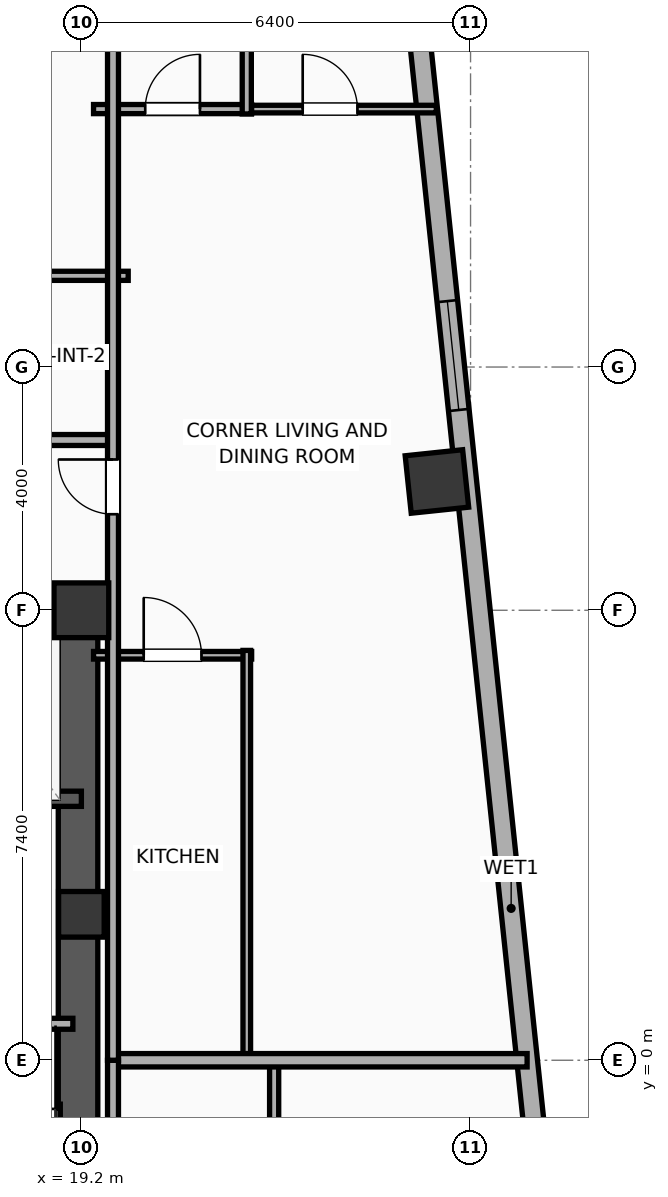
"""IFC4 building model, lengths in metres.
Left out: names, types, materials, properties, quantities, classifications, styles, units other than length and angle.
Written with IfcOpenShell. Run it as: python <this file> out.ifc"""

import sys

from ifc_helpers import new_model, si_unit, direction, frame, frame_2d, origin, origin_2d, place, context, subcontext, project, spatial, rectangle, hollow_rectangle, extrude, element, fill, save


model = new_model("IFC4")
c1 = context("Model", 3, precision=1e-05, world=origin(), true_north=direction((0.0, 1.0)))
c2 = subcontext(c1, "Body", "Model", "MODEL_VIEW")
j1 = project(units=[si_unit("LENGTHUNIT", "METRE"), si_unit("PLANEANGLEUNIT", "RADIAN")], contexts=[c1])
p1 = place(None, origin())
s1 = spatial("IfcSite", under=j1, at=p1, CompositionType="ELEMENT")
p2 = place(p1, origin())
s2 = spatial("IfcBuilding", under=s1, at=p2, CompositionType="ELEMENT")
p3 = place(p2, frame((0.0, 0.0, 187.2)))
s3 = spatial("IfcBuildingStorey", under=s2, at=p3, CompositionType="ELEMENT", Elevation=187.2)
p4 = place(p3, frame((19.2, 2.4, 0.0), z_axis=(0.0, 0.0, 1.0), x_axis=(1.0, 0.0, 0.0)))
e1 = element("IfcColumn", 1, at=p4, inside=s3, PredefinedType="COLUMN", context=c2, shape_type="SweptSolid", body=[
    extrude(rectangle(XDim=0.75, YDim=0.75, at=origin_2d()), origin(), (0.0, 0.0, 1.0), 3.9),
])
p5 = place(p3, frame((19.2, 7.4, 0.0), z_axis=(0.0, 0.0, 1.0), x_axis=(1.0, 0.0, 0.0)))
e2 = element("IfcColumn", 2, at=p5, inside=s3, PredefinedType="COLUMN", context=c2, shape_type="SweptSolid", body=[
    extrude(rectangle(XDim=0.9, YDim=0.9, at=origin_2d()), origin(), (0.0, 0.0, 1.0), 3.9),
])
p6 = place(p3, frame((12.175, 7.4, 0.0), z_axis=(0.0, 0.0, 1.0), x_axis=(1.0, 0.0, 0.0)))
e3 = element("IfcWall", 3, at=p6, inside=s3, PredefinedType="SHEAR", context=c2, shape_type="SweptSolid", body=[
    extrude(rectangle(XDim=7.25, YDim=0.45, at=frame_2d((3.625, 0.0))), origin(), (0.0, 0.0, 1.0), 3.65),
])
p7 = place(p3, frame((19.145, -7.4, 0.0), z_axis=(0.0, 0.0, 1.0), x_axis=(0.0, 1.0, 0.0)))
e4 = element("IfcWall", 4, at=p7, inside=s3, PredefinedType="SHEAR", context=c2, shape_type="SweptSolid", body=[
    extrude(rectangle(XDim=14.8, YDim=0.65, at=frame_2d((7.4, 0.0))), origin(), (0.0, 0.0, 1.0), 3.65),
])
p8 = place(p3, frame((25.047, 9.518, 0.0), z_axis=(0.0, 0.0, 1.0), x_axis=(0.994521895368, 0.104528463268, 0.0)))
e5 = element("IfcColumn", 5, at=p8, inside=s3, PredefinedType="COLUMN", context=c2, shape_type="SweptSolid", body=[
    extrude(hollow_rectangle(XDim=0.95, YDim=0.95, WallThickness=0.032, at=origin_2d()), origin(), (0.0, 0.0, 1.0), 3.9),
])
p9 = place(p3, frame((24.534, 18.99, 0.0), z_axis=(0.0, 0.0, 1.0), x_axis=(0.104534959766, -0.994521212537, 0.0)))
e6 = element("IfcWall", 6, at=p9, inside=s3, PredefinedType="ELEMENTEDWALL", context=c2, shape_type="SweptSolid", body=[
    extrude(rectangle(XDim=33.166, YDim=0.34, at=frame_2d((16.583, 0.0))), origin(), (0.0, 0.0, 1.0), 3.65),
])
p10 = place(p9, frame((6.542, 0.0, 0.75)))
e7 = element("IfcOpeningElement", 7, at=p10, cuts=e6, PredefinedType="OPENING", context=c2, shape_type="SweptSolid", body=[
    extrude(rectangle(XDim=1.8, YDim=2.1, at=frame_2d((0.9, 1.05))), frame((0.0, 0.18, 0.0), z_axis=(0.0, -1.0, 0.0), x_axis=(1.0, 0.0, 0.0)), (0.0, 0.0, 1.0), 0.36),
])
p11 = place(p9, frame((21.84, 0.0, 0.75)))
e8 = element("IfcOpeningElement", 8, at=p11, cuts=e6, PredefinedType="OPENING", context=c2, shape_type="SweptSolid", body=[
    extrude(rectangle(XDim=1.2, YDim=2.05, at=frame_2d((0.6, 1.025))), frame((0.0, 0.18, 0.0), z_axis=(0.0, -1.0, 0.0), x_axis=(1.0, 0.0, 0.0)), (0.0, 0.0, 1.0), 0.36),
])
p12 = place(p3, frame((16.6, 4.3, 0.0), z_axis=(0.0, 0.0, 1.0), x_axis=(1.0, 0.0, 0.0)))
e9 = element("IfcWall", 9, at=p12, inside=s3, PredefinedType="SOLIDWALL", context=c2, shape_type="SweptSolid", body=[
    extrude(rectangle(XDim=2.6, YDim=0.25, at=frame_2d((1.3, 0.0))), origin(), (0.0, 0.0, 1.0), 3.65),
])
p13 = place(p3, frame((15.7, 0.6, 0.0), z_axis=(0.0, 0.0, 1.0), x_axis=(1.0, 0.0, 0.0)))
e10 = element("IfcWall", 10, at=p13, inside=s3, PredefinedType="PARTITIONING", context=c2, shape_type="SweptSolid", body=[
    extrude(rectangle(XDim=3.36, YDim=0.18, at=frame_2d((1.68, 0.0))), origin(), (0.0, 0.0, 1.0), 3.65),
])
p14 = place(p13, frame((1.155, 0.0, 0.0)))
e11 = element("IfcOpeningElement", 11, at=p14, cuts=e10, PredefinedType="OPENING", context=c2, shape_type="SweptSolid", body=[
    extrude(rectangle(XDim=1.05, YDim=2.05, at=frame_2d((0.525, 1.025))), frame((0.0, 0.1, 0.0), z_axis=(0.0, -1.0, 0.0), x_axis=(1.0, 0.0, 0.0)), (0.0, 0.0, 1.0), 0.2),
])
p15 = place(p3, frame((17.337, 12.9, 0.0), z_axis=(0.0, 0.0, 1.0), x_axis=(1.0, 0.0, 0.0)))
e12 = element("IfcWall", 12, at=p15, inside=s3, PredefinedType="PLUMBINGWALL", context=c2, shape_type="SweptSolid", body=[
    extrude(rectangle(XDim=2.633, YDim=0.15, at=frame_2d((1.316, 0.0))), origin(), (0.0, 0.0, 1.0), 3.65),
])
p16 = place(p3, frame((8.08, 10.2, 0.0), z_axis=(0.0, 0.0, 1.0), x_axis=(1.0, 0.0, 0.0)))
e13 = element("IfcWall", 13, at=p16, inside=s3, PredefinedType="PARTITIONING", context=c2, shape_type="SweptSolid", body=[
    extrude(rectangle(XDim=11.67, YDim=0.18, at=frame_2d((5.835, 0.0))), origin(), (0.0, 0.0, 1.0), 3.65),
])
p17 = place(p16, frame((2.604, 0.0, 0.0)))
e14 = element("IfcOpeningElement", 14, at=p17, cuts=e13, PredefinedType="OPENING", context=c2, shape_type="SweptSolid", body=[
    extrude(rectangle(XDim=0.9, YDim=2.05, at=frame_2d((0.45, 1.025))), frame((0.0, 0.1, 0.0), z_axis=(0.0, -1.0, 0.0), x_axis=(1.0, 0.0, 0.0)), (0.0, 0.0, 1.0), 0.2),
])
p18 = place(p16, frame((7.016, 0.0, 0.0)))
e15 = element("IfcOpeningElement", 15, at=p18, cuts=e13, PredefinedType="OPENING", context=c2, shape_type="SweptSolid", body=[
    extrude(rectangle(XDim=1.15, YDim=2.05, at=frame_2d((0.575, 1.025))), frame((0.0, 0.1, 0.0), z_axis=(0.0, -1.0, 0.0), x_axis=(1.0, 0.0, 0.0)), (0.0, 0.0, 1.0), 0.2),
])
p19 = place(p3, frame((22.37, -6.74, 0.0), z_axis=(0.0, 0.0, 1.0), x_axis=(0.0, 1.0, 0.0)))
e16 = element("IfcWall", 16, at=p19, inside=s3, PredefinedType="PLUMBINGWALL", context=c2, shape_type="SweptSolid", body=[
    extrude(rectangle(XDim=6.72, YDim=0.15, at=frame_2d((3.36, 0.0))), origin(), (0.0, 0.0, 1.0), 3.65),
])
p20 = place(p3, frame((21.86, 15.642, 0.0), z_axis=(0.0, 0.0, 1.0), x_axis=(1.0, 0.0, 0.0)))
e17 = element("IfcWall", 17, at=p20, inside=s3, PredefinedType="PARTITIONING", context=c2, shape_type="SweptSolid", body=[
    extrude(rectangle(XDim=3.177, YDim=0.125, at=frame_2d((1.588, 0.0))), origin(), (0.0, 0.0, 1.0), 3.65),
])
p21 = place(p20, frame((0.979, 0.0, 0.0)))
e18 = element("IfcOpeningElement", 18, at=p21, cuts=e17, PredefinedType="OPENING", context=c2, shape_type="SweptSolid", body=[
    extrude(rectangle(XDim=0.9, YDim=2.05, at=frame_2d((0.45, 1.025))), frame((0.0, 0.073, 0.0), z_axis=(0.0, -1.0, 0.0), x_axis=(1.0, 0.0, 0.0)), (0.0, 0.0, 1.0), 0.145),
])
p22 = place(p3, frame((19.4, 6.66, 0.0), z_axis=(0.0, 0.0, 1.0), x_axis=(1.0, 0.0, 0.0)))
e19 = element("IfcWall", 19, at=p22, inside=s3, PredefinedType="PARTITIONING", context=c2, shape_type="SweptSolid", body=[
    extrude(rectangle(XDim=2.6, YDim=0.125, at=frame_2d((1.3, 0.0))), origin(), (0.0, 0.0, 1.0), 3.65),
])
p23 = place(p22, frame((0.825, 0.0, 0.0)))
e20 = element("IfcOpeningElement", 20, at=p23, cuts=e19, PredefinedType="OPENING", context=c2, shape_type="SweptSolid", body=[
    extrude(rectangle(XDim=0.95, YDim=2.05, at=frame_2d((0.475, 1.025))), frame((0.0, 0.073, 0.0), z_axis=(0.0, -1.0, 0.0), x_axis=(1.0, 0.0, 0.0)), (0.0, 0.0, 1.0), 0.145),
])
p24 = place(p3, frame((19.4, 15.642, 0.0), z_axis=(0.0, 0.0, 1.0), x_axis=(1.0, 0.0, 0.0)))
e21 = element("IfcWall", 21, at=p24, inside=s3, PredefinedType="PLUMBINGWALL", context=c2, shape_type="SweptSolid", body=[
    extrude(rectangle(XDim=2.6, YDim=0.15, at=frame_2d((1.3, 0.0))), origin(), (0.0, 0.0, 1.0), 3.65),
])
p25 = place(p24, frame((0.85, 0.0, 0.0)))
e22 = element("IfcOpeningElement", 22, at=p25, cuts=e21, PredefinedType="OPENING", context=c2, shape_type="SweptSolid", body=[
    extrude(rectangle(XDim=0.9, YDim=2.05, at=frame_2d((0.45, 1.025))), frame((0.0, 0.085, 0.0), z_axis=(0.0, -1.0, 0.0), x_axis=(1.0, 0.0, 0.0)), (0.0, 0.0, 1.0), 0.17),
])
p26 = place(p3, frame((21.92, 0.02, 0.0), z_axis=(0.0, 0.0, 1.0), x_axis=(0.0, 1.0, 0.0)))
e23 = element("IfcWall", 23, at=p26, inside=s3, PredefinedType="PARTITIONING", context=c2, shape_type="SweptSolid", body=[
    extrude(rectangle(XDim=6.72, YDim=0.125, at=frame_2d((3.36, 0.0))), origin(), (0.0, 0.0, 1.0), 3.65),
])
p27 = place(p3, frame((21.92, 15.562, 0.0), z_axis=(0.0, 0.0, 1.0), x_axis=(0.0, 1.0, 0.0)))
e24 = element("IfcWall", 24, at=p27, inside=s3, PredefinedType="PLUMBINGWALL", context=c2, shape_type="SweptSolid", body=[
    extrude(rectangle(XDim=6.696, YDim=0.15, at=frame_2d((3.348, 0.0))), origin(), (0.0, 0.0, 1.0), 3.04),
])
p28 = place(p3, frame((19.72, 0.0, 0.0), z_axis=(0.0, 0.0, 1.0), x_axis=(1.0, 0.0, 0.0)))
e25 = element("IfcWall", 25, at=p28, inside=s3, PredefinedType="PARTITIONING", context=c2, shape_type="SweptSolid", body=[
    extrude(rectangle(XDim=6.81, YDim=0.22, at=frame_2d((3.405, 0.0))), origin(), (0.0, 0.0, 1.0), 3.65),
])
p29 = place(p3, frame((19.72, -18.532, 0.0), z_axis=(0.0, 0.0, 1.0), x_axis=(0.0, 1.0, 0.0)))
e26 = element("IfcWall", 26, at=p29, inside=s3, PredefinedType="PARTITIONING", context=c2, shape_type="SweptSolid", body=[
    extrude(rectangle(XDim=18.532, YDim=0.18, at=frame_2d((9.266, 0.0))), origin(), (0.0, 0.0, 1.0), 3.65),
])
p30 = place(p29, frame((8.653, 0.0, 0.0)))
e27 = element("IfcOpeningElement", 27, at=p30, cuts=e26, PredefinedType="OPENING", context=c2, shape_type="SweptSolid", body=[
    extrude(rectangle(XDim=0.9, YDim=2.05, at=frame_2d((0.45, 1.025))), frame((0.0, 0.1, 0.0), z_axis=(0.0, -1.0, 0.0), x_axis=(1.0, 0.0, 0.0)), (0.0, 0.0, 1.0), 0.2),
])
p31 = place(p3, frame((19.72, 0.0, 0.0), z_axis=(0.0, 0.0, 1.0), x_axis=(0.0, 1.0, 0.0)))
e28 = element("IfcWall", 28, at=p31, inside=s3, PredefinedType="PARTITIONING", context=c2, shape_type="SweptSolid", body=[
    extrude(rectangle(XDim=22.15, YDim=0.18, at=frame_2d((11.075, 0.0))), origin(), (0.0, 0.0, 1.0), 3.04),
])
p32 = place(p31, frame((8.979, 0.0, 0.0)))
e29 = element("IfcOpeningElement", 29, at=p32, cuts=e28, PredefinedType="OPENING", context=c2, shape_type="SweptSolid", body=[
    extrude(rectangle(XDim=0.9, YDim=2.05, at=frame_2d((0.45, 1.025))), frame((0.0, 0.1, 0.0), z_axis=(0.0, -1.0, 0.0), x_axis=(1.0, 0.0, 0.0)), (0.0, 0.0, 1.0), 0.2),
])
p33 = place(p10, origin())
e30 = element("IfcWindow", 30, at=p33, inside=s3, PartitioningType="SINGLE_PANEL", PredefinedType="WINDOW", context=c2, shape_type="SweptSolid", body=[
    extrude(rectangle(XDim=1.8, YDim=2.1, at=frame_2d((0.9, 1.05))), frame((0.0, 0.03, 0.0), z_axis=(0.0, -1.0, 0.0), x_axis=(1.0, 0.0, 0.0)), (0.0, 0.0, 1.0), 0.06),
])
fill(e7, e30)
p34 = place(p21, origin())
e31 = element("IfcDoor", 31, at=p34, inside=s3, OperationType="SINGLE_SWING_LEFT", PredefinedType="DOOR", context=c2, shape_type="SweptSolid", body=[
    extrude(rectangle(XDim=0.9, YDim=2.05, at=frame_2d((0.45, 1.025))), frame((0.0, 0.025, 0.0), z_axis=(0.0, -1.0, 0.0), x_axis=(1.0, 0.0, 0.0)), (0.0, 0.0, 1.0), 0.05),
])
fill(e18, e31)
p35 = place(p23, origin())
e32 = element("IfcDoor", 32, at=p35, inside=s3, OperationType="SINGLE_SWING_LEFT", PredefinedType="DOOR", context=c2, shape_type="SweptSolid", body=[
    extrude(rectangle(XDim=0.95, YDim=2.05, at=frame_2d((0.475, 1.025))), frame((0.0, 0.025, 0.0), z_axis=(0.0, -1.0, 0.0), x_axis=(1.0, 0.0, 0.0)), (0.0, 0.0, 1.0), 0.05),
])
fill(e20, e32)
p36 = place(p25, origin())
e33 = element("IfcDoor", 33, at=p36, inside=s3, OperationType="SINGLE_SWING_RIGHT", PredefinedType="DOOR", context=c2, shape_type="SweptSolid", body=[
    extrude(rectangle(XDim=0.9, YDim=2.05, at=frame_2d((0.45, 1.025))), frame((0.0, 0.025, 0.0), z_axis=(0.0, -1.0, 0.0), x_axis=(1.0, 0.0, 0.0)), (0.0, 0.0, 1.0), 0.05),
])
fill(e22, e33)
p37 = place(p32, origin())
e34 = element("IfcDoor", 34, at=p37, inside=s3, OperationType="SINGLE_SWING_RIGHT", PredefinedType="DOOR", context=c2, shape_type="SweptSolid", body=[
    extrude(rectangle(XDim=0.9, YDim=2.05, at=frame_2d((0.45, 1.025))), frame((0.0, 0.025, 0.0), z_axis=(0.0, -1.0, 0.0), x_axis=(1.0, 0.0, 0.0)), (0.0, 0.0, 1.0), 0.05),
])
fill(e29, e34)
save(model, sys.argv[1])
